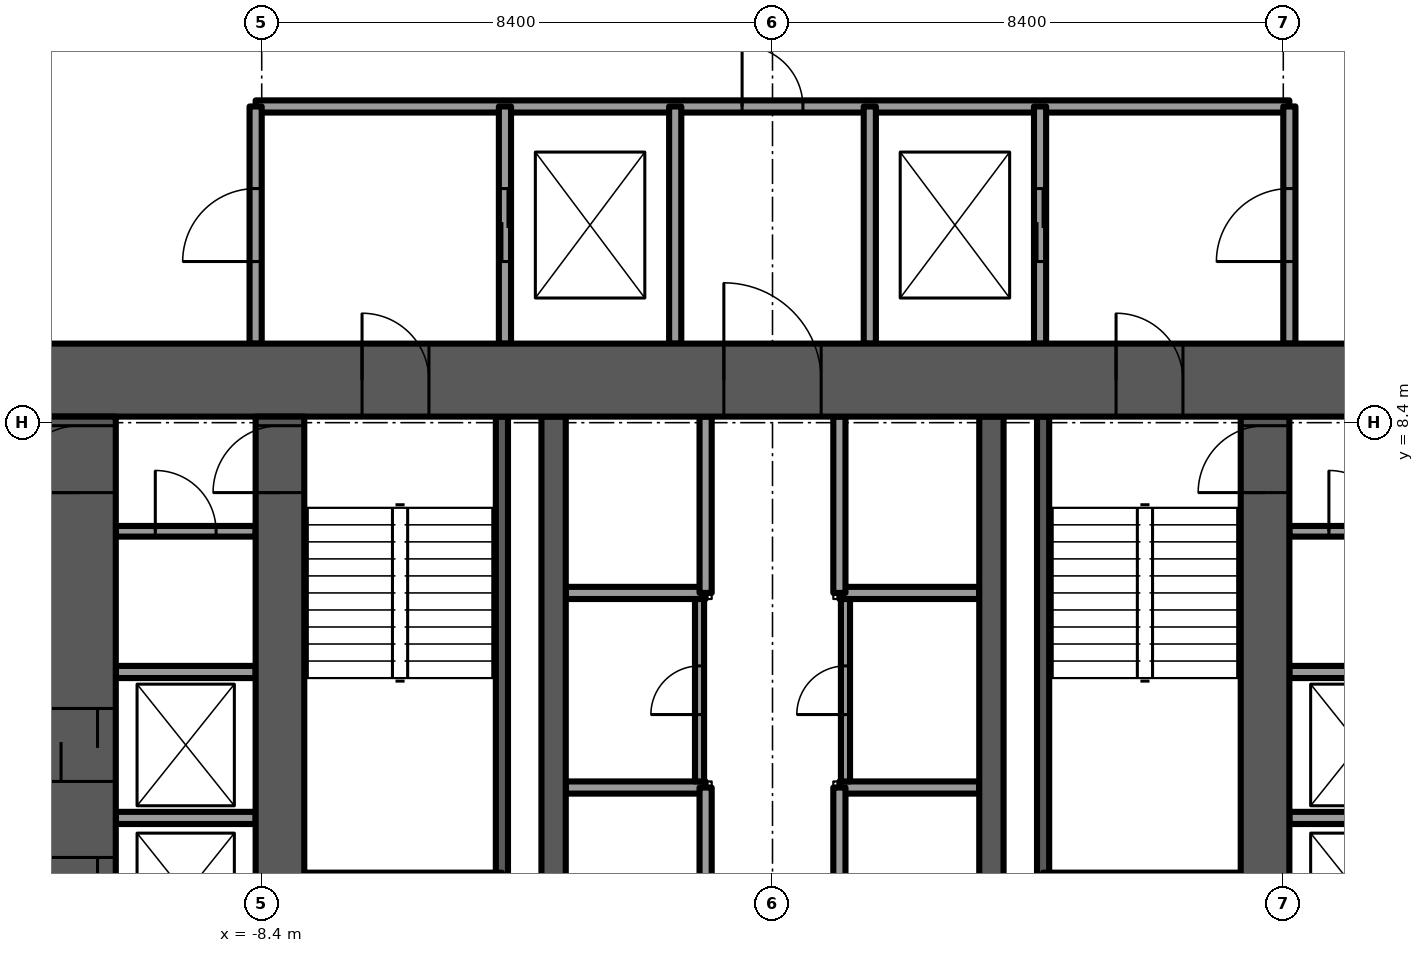
"""IFC4 building model, lengths in metres.
Left out: names, types, materials, properties, quantities, classifications, styles, units other than length and angle.
Written with IfcOpenShell. Run it as: python <this file> out.ifc"""

import sys

from ifc_helpers import new_model, si_unit, direction, frame, frame_2d, origin, place, context, subcontext, project, spatial, rectangle, extrude, element, fill, save


model = new_model("IFC4")
c1 = context("Model", 3, precision=1e-05, world=origin(), true_north=direction((0.0, 1.0)))
c2 = subcontext(c1, "Body", "Model", "MODEL_VIEW")
j1 = project(units=[si_unit("LENGTHUNIT", "METRE"), si_unit("PLANEANGLEUNIT", "RADIAN")], contexts=[c1])
p1 = place(None, origin())
s1 = spatial("IfcSite", under=j1, at=p1, CompositionType="ELEMENT")
p2 = place(p1, origin())
s2 = spatial("IfcBuilding", under=s1, at=p2, CompositionType="ELEMENT")
p3 = place(p2, frame((0.0, 0.0, 73.0)))
s3 = spatial("IfcBuildingStorey", under=s2, at=p3, CompositionType="ELEMENT", Elevation=73.0)
p4 = place(p3, frame((-12.0, 9.1, -0.3), z_axis=(0.0, 0.0, 1.0), x_axis=(1.0, 0.0, 0.0)))
e1 = element("IfcWall", 1, at=p4, inside=s3, PredefinedType="SHEAR", context=c2, shape_type="SweptSolid", body=[
    extrude(rectangle(XDim=24.0, YDim=1.2, at=frame_2d((12.0, 0.0))), origin(), (0.0, 0.0, 1.0), 3.75),
])
p5 = place(p4, frame((11.2, 0.0, 0.0)))
e2 = element("IfcOpeningElement", 2, at=p5, cuts=e1, PredefinedType="OPENING", context=c2, shape_type="SweptSolid", body=[
    extrude(rectangle(XDim=1.6, YDim=2.1, at=frame_2d((0.8, 1.05))), frame((0.0, 0.6, 0.0), z_axis=(0.0, -1.0, 0.0), x_axis=(1.0, 0.0, 0.0)), (0.0, 0.0, 1.0), 1.2),
])
p6 = place(p4, frame((5.25, 0.0, 0.0)))
e3 = element("IfcOpeningElement", 3, at=p6, cuts=e1, PredefinedType="OPENING", context=c2, shape_type="SweptSolid", body=[
    extrude(rectangle(XDim=1.1, YDim=2.1, at=frame_2d((0.55, 1.05))), frame((0.0, 0.6, 0.0), z_axis=(0.0, -1.0, 0.0), x_axis=(1.0, 0.0, 0.0)), (0.0, 0.0, 1.0), 1.2),
])
p7 = place(p4, frame((17.65, 0.0, 0.0)))
e4 = element("IfcOpeningElement", 4, at=p7, cuts=e1, PredefinedType="OPENING", context=c2, shape_type="SweptSolid", body=[
    extrude(rectangle(XDim=1.1, YDim=2.1, at=frame_2d((0.55, 1.05))), frame((0.0, 0.6, 0.0), z_axis=(0.0, -1.0, 0.0), x_axis=(1.0, 0.0, 0.0)), (0.0, 0.0, 1.0), 1.2),
])
p8 = place(p3, frame((-8.1, -0.5, -0.3), z_axis=(0.0, 0.0, 1.0), x_axis=(0.0, 1.0, 0.0)))
e5 = element("IfcWall", 5, at=p8, inside=s3, PredefinedType="SHEAR", context=c2, shape_type="SweptSolid", body=[
    extrude(rectangle(XDim=9.0, YDim=0.8, at=frame_2d((4.5, 0.0))), origin(), (0.0, 0.0, 1.0), 3.75),
])
p9 = place(p8, frame((7.75, 0.0, 0.0)))
e6 = element("IfcOpeningElement", 6, at=p9, cuts=e5, PredefinedType="OPENING", context=c2, shape_type="SweptSolid", body=[
    extrude(rectangle(XDim=1.1, YDim=2.1, at=frame_2d((0.55, 1.05))), frame((0.0, 0.4, 0.0), z_axis=(0.0, -1.0, 0.0), x_axis=(1.0, 0.0, 0.0)), (0.0, 0.0, 1.0), 0.8),
])
p10 = place(p3, frame((8.1, -0.5, -0.3), z_axis=(0.0, 0.0, 1.0), x_axis=(0.0, 1.0, 0.0)))
e7 = element("IfcWall", 7, at=p10, inside=s3, PredefinedType="SHEAR", context=c2, shape_type="SweptSolid", body=[
    extrude(rectangle(XDim=9.0, YDim=0.8, at=frame_2d((4.5, 0.0))), origin(), (0.0, 0.0, 1.0), 3.75),
])
p11 = place(p10, frame((7.75, 0.0, 0.0)))
e8 = element("IfcOpeningElement", 8, at=p11, cuts=e7, PredefinedType="OPENING", context=c2, shape_type="SweptSolid", body=[
    extrude(rectangle(XDim=1.1, YDim=2.1, at=frame_2d((0.55, 1.05))), frame((0.0, 0.4, 0.0), z_axis=(0.0, -1.0, 0.0), x_axis=(1.0, 0.0, 0.0)), (0.0, 0.0, 1.0), 0.8),
])
for number, where, z_axis, x_axis in (
    (9, (-3.6, -0.5, -0.3), (0.0, 0.0, 1.0), (0.0, 1.0, 0.0)),
    (10, (3.6, -0.5, -0.3), (0.0, 0.0, 1.0), (0.0, 1.0, 0.0)),
):
    element("IfcWall", number, at=place(p3, frame(where, z_axis=z_axis, x_axis=x_axis)), inside=s3, PredefinedType="SHEAR", context=c2, shape_type="SweptSolid", body=[
        extrude(rectangle(XDim=9.0, YDim=0.4, at=frame_2d((4.5, 0.0))), origin(), (0.0, 0.0, 1.0), 3.75),
    ])
p12 = place(p3, frame((-11.4, -0.5, -0.3), z_axis=(0.0, 0.0, 1.0), x_axis=(0.0, 1.0, 0.0)))
e11 = element("IfcWall", 11, at=p12, inside=s3, PredefinedType="SHEAR", context=c2, shape_type="SweptSolid", body=[
    extrude(rectangle(XDim=9.0, YDim=1.2, at=frame_2d((4.5, 0.0))), origin(), (0.0, 0.0, 1.0), 3.75),
])
p13 = place(p12, frame((7.75, 0.0, 0.0)))
e12 = element("IfcOpeningElement", 12, at=p13, cuts=e11, PredefinedType="OPENING", context=c2, shape_type="SweptSolid", body=[
    extrude(rectangle(XDim=1.1, YDim=2.1, at=frame_2d((0.55, 1.05))), frame((0.0, 0.6, 0.0), z_axis=(0.0, -1.0, 0.0), x_axis=(1.0, 0.0, 0.0)), (0.0, 0.0, 1.0), 1.2),
])
p14 = place(p12, frame((0.55, 0.0, 0.0)))
e13 = element("IfcOpeningElement", 13, at=p14, cuts=e11, PredefinedType="OPENING", context=c2, shape_type="SweptSolid", body=[
    extrude(rectangle(XDim=1.2, YDim=2.1, at=frame_2d((0.6, 1.05))), frame((0.0, 0.6, 0.0), z_axis=(0.0, -1.0, 0.0), x_axis=(1.0, 0.0, 0.0)), (0.0, 0.0, 1.0), 1.2),
])
p15 = place(p12, frame((3.0, 0.0, 0.0)))
e14 = element("IfcOpeningElement", 14, at=p15, cuts=e11, PredefinedType="OPENING", context=c2, shape_type="SweptSolid", body=[
    extrude(rectangle(XDim=1.2, YDim=2.1, at=frame_2d((0.6, 1.05))), frame((0.0, 0.6, 0.0), z_axis=(0.0, -1.0, 0.0), x_axis=(1.0, 0.0, 0.0)), (0.0, 0.0, 1.0), 1.2),
])
p16 = place(p3, frame((-11.571, 20.694, 0.0), z_axis=(0.0, 0.0, 1.0), x_axis=(-0.50000343918, -0.866023418164, 0.0)))
e15 = element("IfcWall", 15, at=p16, inside=s3, PredefinedType="PARAPET", context=c2, shape_type="SweptSolid", body=[
    extrude(rectangle(XDim=7.271, YDim=0.9, at=frame_2d((3.635, 0.0))), origin(), (0.0, 0.0, 1.0), 1.1),
])
for number, where, z_axis, x_axis in (
    (16, (-3.4, 2.4, 0.0), (0.0, 0.0, 1.0), (1.0, 0.0, 0.0)),
    (17, (-3.4, 5.6, 0.0), (0.0, 0.0, 1.0), (1.0, 0.0, 0.0)),
    (18, (1.1, 2.4, 0.0), (0.0, 0.0, 1.0), (1.0, 0.0, 0.0)),
    (19, (1.1, 5.6, 0.0), (0.0, 0.0, 1.0), (1.0, 0.0, 0.0)),
):
    element("IfcWall", number, at=place(p3, frame(where, z_axis=z_axis, x_axis=x_axis)), inside=s3, PredefinedType="PARTITIONING", context=c2, shape_type="SweptSolid", body=[
        extrude(rectangle(XDim=2.3, YDim=0.2, at=frame_2d((1.15, 0.0))), origin(), (0.0, 0.0, 1.0), 3.45),
    ])
for number, where, z_axis, x_axis in (
    (20, (-1.1, -0.5, 0.0), (0.0, 0.0, 1.0), (0.0, 1.0, 0.0)),
    (21, (1.1, -0.5, 0.0), (0.0, 0.0, 1.0), (0.0, 1.0, 0.0)),
    (22, (-1.1, 5.6, 0.0), (0.0, 0.0, 1.0), (0.0, 1.0, 0.0)),
    (23, (1.1, 5.6, 0.0), (0.0, 0.0, 1.0), (0.0, 1.0, 0.0)),
):
    element("IfcWall", number, at=place(p3, frame(where, z_axis=z_axis, x_axis=x_axis)), inside=s3, PredefinedType="PARTITIONING", context=c2, shape_type="SweptSolid", body=[
        extrude(rectangle(XDim=2.9, YDim=0.2, at=frame_2d((1.45, 0.0))), origin(), (0.0, 0.0, 1.0), 3.45),
    ])
for number, where, z_axis, x_axis in (
    (24, (-4.45, 0.9, -0.3), (0.0, 0.0, 1.0), (0.0, 1.0, 0.0)),
    (25, (4.45, 0.9, -0.3), (0.0, 0.0, 1.0), (0.0, 1.0, 0.0)),
):
    element("IfcWall", number, at=place(p3, frame(where, z_axis=z_axis, x_axis=x_axis)), inside=s3, PredefinedType="SOLIDWALL", context=c2, shape_type="SweptSolid", body=[
        extrude(rectangle(XDim=7.6, YDim=0.2, at=frame_2d((3.8, 0.0))), origin(), (0.0, 0.0, 1.0), 3.75),
    ])
p17 = place(p3, frame((-8.5, 13.6, 0.0), z_axis=(0.0, 0.0, 1.0), x_axis=(1.0, 0.0, 0.0)))
e26 = element("IfcWall", 26, at=p17, inside=s3, PredefinedType="PARTITIONING", context=c2, shape_type="SweptSolid", body=[
    extrude(rectangle(XDim=17.0, YDim=0.2, at=frame_2d((8.5, 0.0))), origin(), (0.0, 0.0, 1.0), 3.45),
])
p18 = place(p17, frame((8.0, 0.0, 0.0)))
e27 = element("IfcOpeningElement", 27, at=p18, cuts=e26, PredefinedType="OPENING", context=c2, shape_type="SweptSolid", body=[
    extrude(rectangle(XDim=1.0, YDim=2.1, at=frame_2d((0.5, 1.05))), frame((0.0, 0.1, 0.0), z_axis=(0.0, -1.0, 0.0), x_axis=(1.0, 0.0, 0.0)), (0.0, 0.0, 1.0), 0.2),
])
p19 = place(p3, frame((-8.5, 9.7, 0.0), z_axis=(0.0, 0.0, 1.0), x_axis=(0.0, 1.0, 0.0)))
e28 = element("IfcWall", 28, at=p19, inside=s3, PredefinedType="PARTITIONING", context=c2, shape_type="SweptSolid", body=[
    extrude(rectangle(XDim=3.9, YDim=0.2, at=frame_2d((1.95, 0.0))), origin(), (0.0, 0.0, 1.0), 3.45),
])
p20 = place(p19, frame((1.35, 0.0, 0.0)))
e29 = element("IfcOpeningElement", 29, at=p20, cuts=e28, PredefinedType="OPENING", context=c2, shape_type="SweptSolid", body=[
    extrude(rectangle(XDim=1.2, YDim=2.1, at=frame_2d((0.6, 1.05))), frame((0.0, 0.1, 0.0), z_axis=(0.0, -1.0, 0.0), x_axis=(1.0, 0.0, 0.0)), (0.0, 0.0, 1.0), 0.2),
])
p21 = place(p3, frame((8.5, 9.7, 0.0), z_axis=(0.0, 0.0, 1.0), x_axis=(0.0, 1.0, 0.0)))
e30 = element("IfcWall", 30, at=p21, inside=s3, PredefinedType="PARTITIONING", context=c2, shape_type="SweptSolid", body=[
    extrude(rectangle(XDim=3.9, YDim=0.2, at=frame_2d((1.95, 0.0))), origin(), (0.0, 0.0, 1.0), 3.45),
])
p22 = place(p21, frame((1.35, 0.0, 0.0)))
e31 = element("IfcOpeningElement", 31, at=p22, cuts=e30, PredefinedType="OPENING", context=c2, shape_type="SweptSolid", body=[
    extrude(rectangle(XDim=1.2, YDim=2.1, at=frame_2d((0.6, 1.05))), frame((0.0, 0.1, 0.0), z_axis=(0.0, -1.0, 0.0), x_axis=(1.0, 0.0, 0.0)), (0.0, 0.0, 1.0), 0.2),
])
p23 = place(p3, frame((-4.4, 9.7, 0.0), z_axis=(0.0, 0.0, 1.0), x_axis=(0.0, 1.0, 0.0)))
e32 = element("IfcWall", 32, at=p23, inside=s3, PredefinedType="PARTITIONING", context=c2, shape_type="SweptSolid", body=[
    extrude(rectangle(XDim=3.9, YDim=0.2, at=frame_2d((1.95, 0.0))), origin(), (0.0, 0.0, 1.0), 3.45),
])
p24 = place(p23, frame((1.35, 0.0, 0.0)))
e33 = element("IfcOpeningElement", 33, at=p24, cuts=e32, PredefinedType="OPENING", context=c2, shape_type="SweptSolid", body=[
    extrude(rectangle(XDim=1.2, YDim=2.1, at=frame_2d((0.6, 1.05))), frame((0.0, 0.1, 0.0), z_axis=(0.0, -1.0, 0.0), x_axis=(1.0, 0.0, 0.0)), (0.0, 0.0, 1.0), 0.2),
])
p25 = place(p3, frame((4.4, 9.7, 0.0), z_axis=(0.0, 0.0, 1.0), x_axis=(0.0, 1.0, 0.0)))
e34 = element("IfcWall", 34, at=p25, inside=s3, PredefinedType="PARTITIONING", context=c2, shape_type="SweptSolid", body=[
    extrude(rectangle(XDim=3.9, YDim=0.2, at=frame_2d((1.95, 0.0))), origin(), (0.0, 0.0, 1.0), 3.45),
])
p26 = place(p25, frame((1.35, 0.0, 0.0)))
e35 = element("IfcOpeningElement", 35, at=p26, cuts=e34, PredefinedType="OPENING", context=c2, shape_type="SweptSolid", body=[
    extrude(rectangle(XDim=1.2, YDim=2.1, at=frame_2d((0.6, 1.05))), frame((0.0, 0.1, 0.0), z_axis=(0.0, -1.0, 0.0), x_axis=(1.0, 0.0, 0.0)), (0.0, 0.0, 1.0), 0.2),
])
for number, where, z_axis, x_axis in (
    (36, (-1.6, 9.7, 0.0), (0.0, 0.0, 1.0), (0.0, 1.0, 0.0)),
    (37, (1.6, 9.7, 0.0), (0.0, 0.0, 1.0), (0.0, 1.0, 0.0)),
):
    element("IfcWall", number, at=place(p3, frame(where, z_axis=z_axis, x_axis=x_axis)), inside=s3, PredefinedType="PARTITIONING", context=c2, shape_type="SweptSolid", body=[
        extrude(rectangle(XDim=3.9, YDim=0.2, at=frame_2d((1.95, 0.0))), origin(), (0.0, 0.0, 1.0), 3.45),
    ])
p27 = place(p3, frame((-1.2, 2.5, 0.0), z_axis=(0.0, 0.0, 1.0), x_axis=(0.0, 1.0, 0.0)))
e38 = element("IfcWall", 38, at=p27, inside=s3, PredefinedType="PARTITIONING", context=c2, shape_type="SweptSolid", body=[
    extrude(rectangle(XDim=3.0, YDim=0.15, at=frame_2d((1.5, 0.0))), origin(), (0.0, 0.0, 1.0), 3.45),
])
p28 = place(p27, frame((1.1, 0.0, 0.0)))
e39 = element("IfcOpeningElement", 39, at=p28, cuts=e38, PredefinedType="OPENING", context=c2, shape_type="SweptSolid", body=[
    extrude(rectangle(XDim=0.8, YDim=2.1, at=frame_2d((0.4, 1.05))), frame((0.0, 0.075, 0.0), z_axis=(0.0, -1.0, 0.0), x_axis=(1.0, 0.0, 0.0)), (0.0, 0.0, 1.0), 0.15),
])
p29 = place(p3, frame((1.2, 2.5, 0.0), z_axis=(0.0, 0.0, 1.0), x_axis=(0.0, 1.0, 0.0)))
e40 = element("IfcWall", 40, at=p29, inside=s3, PredefinedType="PARTITIONING", context=c2, shape_type="SweptSolid", body=[
    extrude(rectangle(XDim=3.0, YDim=0.15, at=frame_2d((1.5, 0.0))), origin(), (0.0, 0.0, 1.0), 3.45),
])
p30 = place(p29, frame((1.1, 0.0, 0.0)))
e41 = element("IfcOpeningElement", 41, at=p30, cuts=e40, PredefinedType="OPENING", context=c2, shape_type="SweptSolid", body=[
    extrude(rectangle(XDim=0.8, YDim=2.1, at=frame_2d((0.4, 1.05))), frame((0.0, 0.075, 0.0), z_axis=(0.0, -1.0, 0.0), x_axis=(1.0, 0.0, 0.0)), (0.0, 0.0, 1.0), 0.15),
])
for number, where, z_axis, x_axis in (
    (42, (-10.8, 1.9, 0.0), (0.0, 0.0, 1.0), (1.0, 0.0, 0.0)),
    (43, (-10.8, 4.3, 0.0), (0.0, 0.0, 1.0), (1.0, 0.0, 0.0)),
):
    element("IfcWall", number, at=place(p3, frame(where, z_axis=z_axis, x_axis=x_axis)), inside=s3, PredefinedType="PARTITIONING", context=c2, shape_type="SweptSolid", body=[
        extrude(rectangle(XDim=2.3, YDim=0.2, at=frame_2d((1.15, 0.0))), origin(), (0.0, 0.0, 1.0), 3.45),
    ])
p31 = place(p3, frame((-10.8, 6.614, 0.0), z_axis=(0.0, 0.0, 1.0), x_axis=(1.0, 0.0, 0.0)))
e44 = element("IfcWall", 44, at=p31, inside=s3, PredefinedType="PARTITIONING", context=c2, shape_type="SweptSolid", body=[
    extrude(rectangle(XDim=2.3, YDim=0.175, at=frame_2d((1.15, 0.0))), origin(), (0.0, 0.0, 1.0), 3.45),
])
p32 = place(p31, frame((0.65, 0.0, 0.0)))
e45 = element("IfcOpeningElement", 45, at=p32, cuts=e44, PredefinedType="OPENING", context=c2, shape_type="SweptSolid", body=[
    extrude(rectangle(XDim=1.0, YDim=2.1, at=frame_2d((0.5, 1.05))), frame((0.0, 0.087, 0.0), z_axis=(0.0, -1.0, 0.0), x_axis=(1.0, 0.0, 0.0)), (0.0, 0.0, 1.0), 0.175),
])
for number, where, z_axis, x_axis in (
    (46, (8.5, 1.9, 0.0), (0.0, 0.0, 1.0), (1.0, 0.0, 0.0)),
    (47, (8.5, 4.3, 0.0), (0.0, 0.0, 1.0), (1.0, 0.0, 0.0)),
):
    element("IfcWall", number, at=place(p3, frame(where, z_axis=z_axis, x_axis=x_axis)), inside=s3, PredefinedType="PARTITIONING", context=c2, shape_type="SweptSolid", body=[
        extrude(rectangle(XDim=2.3, YDim=0.2, at=frame_2d((1.15, 0.0))), origin(), (0.0, 0.0, 1.0), 3.45),
    ])
p33 = place(p3, frame((8.5, 6.614, 0.0), z_axis=(0.0, 0.0, 1.0), x_axis=(1.0, 0.0, 0.0)))
e48 = element("IfcWall", 48, at=p33, inside=s3, PredefinedType="PARTITIONING", context=c2, shape_type="SweptSolid", body=[
    extrude(rectangle(XDim=2.3, YDim=0.175, at=frame_2d((1.15, 0.0))), origin(), (0.0, 0.0, 1.0), 3.45),
])
p34 = place(p33, frame((0.65, 0.0, 0.0)))
e49 = element("IfcOpeningElement", 49, at=p34, cuts=e48, PredefinedType="OPENING", context=c2, shape_type="SweptSolid", body=[
    extrude(rectangle(XDim=1.0, YDim=2.1, at=frame_2d((0.5, 1.05))), frame((0.0, 0.087, 0.0), z_axis=(0.0, -1.0, 0.0), x_axis=(1.0, 0.0, 0.0)), (0.0, 0.0, 1.0), 0.175),
])
p35 = place(p5, origin())
e50 = element("IfcDoor", 50, at=p35, inside=s3, OperationType="DOUBLE_DOOR_SINGLE_SWING", PredefinedType="DOOR", context=c2, shape_type="SweptSolid", body=[
    extrude(rectangle(XDim=1.6, YDim=2.1, at=frame_2d((0.8, 1.05))), frame((0.0, 0.025, 0.0), z_axis=(0.0, -1.0, 0.0), x_axis=(1.0, 0.0, 0.0)), (0.0, 0.0, 1.0), 0.05),
])
fill(e2, e50)
p36 = place(p6, origin())
e51 = element("IfcDoor", 51, at=p36, inside=s3, OperationType="SINGLE_SWING_LEFT", PredefinedType="DOOR", context=c2, shape_type="SweptSolid", body=[
    extrude(rectangle(XDim=1.1, YDim=2.1, at=frame_2d((0.55, 1.05))), frame((0.0, 0.025, 0.0), z_axis=(0.0, -1.0, 0.0), x_axis=(1.0, 0.0, 0.0)), (0.0, 0.0, 1.0), 0.05),
])
fill(e3, e51)
p37 = place(p9, origin())
e52 = element("IfcDoor", 52, at=p37, inside=s3, OperationType="SINGLE_SWING_RIGHT", PredefinedType="DOOR", context=c2, shape_type="SweptSolid", body=[
    extrude(rectangle(XDim=1.1, YDim=2.1, at=frame_2d((0.55, 1.05))), frame((0.0, 0.025, 0.0), z_axis=(0.0, -1.0, 0.0), x_axis=(1.0, 0.0, 0.0)), (0.0, 0.0, 1.0), 0.05),
])
fill(e6, e52)
p38 = place(p7, origin())
e53 = element("IfcDoor", 53, at=p38, inside=s3, OperationType="SINGLE_SWING_RIGHT", PredefinedType="DOOR", context=c2, shape_type="SweptSolid", body=[
    extrude(rectangle(XDim=1.1, YDim=2.1, at=frame_2d((0.55, 1.05))), frame((0.0, 0.025, 0.0), z_axis=(0.0, -1.0, 0.0), x_axis=(1.0, 0.0, 0.0)), (0.0, 0.0, 1.0), 0.05),
])
fill(e4, e53)
p39 = place(p11, origin())
e54 = element("IfcDoor", 54, at=p39, inside=s3, OperationType="SINGLE_SWING_LEFT", PredefinedType="DOOR", context=c2, shape_type="SweptSolid", body=[
    extrude(rectangle(XDim=1.1, YDim=2.1, at=frame_2d((0.55, 1.05))), frame((0.0, 0.025, 0.0), z_axis=(0.0, -1.0, 0.0), x_axis=(1.0, 0.0, 0.0)), (0.0, 0.0, 1.0), 0.05),
])
fill(e8, e54)
p40 = place(p24, origin())
e55 = element("IfcDoor", 55, at=p40, inside=s3, OperationType="SLIDING_TO_LEFT", PredefinedType="DOOR", context=c2, shape_type="SweptSolid", body=[
    extrude(rectangle(XDim=1.2, YDim=2.1, at=frame_2d((0.6, 1.05))), frame((0.0, 0.025, 0.0), z_axis=(0.0, -1.0, 0.0), x_axis=(1.0, 0.0, 0.0)), (0.0, 0.0, 1.0), 0.05),
])
fill(e33, e55)
p41 = place(p20, origin())
e56 = element("IfcDoor", 56, at=p41, inside=s3, OperationType="SINGLE_SWING_LEFT", PredefinedType="DOOR", context=c2, shape_type="SweptSolid", body=[
    extrude(rectangle(XDim=1.2, YDim=2.1, at=frame_2d((0.6, 1.05))), frame((0.0, 0.025, 0.0), z_axis=(0.0, -1.0, 0.0), x_axis=(1.0, 0.0, 0.0)), (0.0, 0.0, 1.0), 0.05),
])
fill(e29, e56)
p42 = place(p26, origin())
e57 = element("IfcDoor", 57, at=p42, inside=s3, OperationType="SLIDING_TO_LEFT", PredefinedType="DOOR", context=c2, shape_type="SweptSolid", body=[
    extrude(rectangle(XDim=1.2, YDim=2.1, at=frame_2d((0.6, 1.05))), frame((0.0, 0.025, 0.0), z_axis=(0.0, -1.0, 0.0), x_axis=(1.0, 0.0, 0.0)), (0.0, 0.0, 1.0), 0.05),
])
fill(e35, e57)
p43 = place(p22, origin())
e58 = element("IfcDoor", 58, at=p43, inside=s3, OperationType="SINGLE_SWING_LEFT", PredefinedType="DOOR", context=c2, shape_type="SweptSolid", body=[
    extrude(rectangle(XDim=1.2, YDim=2.1, at=frame_2d((0.6, 1.05))), frame((0.0, 0.025, 0.0), z_axis=(0.0, -1.0, 0.0), x_axis=(1.0, 0.0, 0.0)), (0.0, 0.0, 1.0), 0.05),
])
fill(e31, e58)
p44 = place(p18, origin())
e59 = element("IfcDoor", 59, at=p44, inside=s3, OperationType="SINGLE_SWING_LEFT", PredefinedType="DOOR", context=c2, shape_type="SweptSolid", body=[
    extrude(rectangle(XDim=1.0, YDim=2.1, at=frame_2d((0.5, 1.05))), frame((0.0, 0.025, 0.0), z_axis=(0.0, -1.0, 0.0), x_axis=(1.0, 0.0, 0.0)), (0.0, 0.0, 1.0), 0.05),
])
fill(e27, e59)
p45 = place(p28, origin())
e60 = element("IfcDoor", 60, at=p45, inside=s3, OperationType="SINGLE_SWING_LEFT", PredefinedType="DOOR", context=c2, shape_type="SweptSolid", body=[
    extrude(rectangle(XDim=0.8, YDim=2.1, at=frame_2d((0.4, 1.05))), frame((0.0, 0.025, 0.0), z_axis=(0.0, -1.0, 0.0), x_axis=(1.0, 0.0, 0.0)), (0.0, 0.0, 1.0), 0.05),
])
fill(e39, e60)
p46 = place(p30, origin())
e61 = element("IfcDoor", 61, at=p46, inside=s3, OperationType="SINGLE_SWING_RIGHT", PredefinedType="DOOR", context=c2, shape_type="SweptSolid", body=[
    extrude(rectangle(XDim=0.8, YDim=2.1, at=frame_2d((0.4, 1.05))), frame((0.0, 0.025, 0.0), z_axis=(0.0, -1.0, 0.0), x_axis=(1.0, 0.0, 0.0)), (0.0, 0.0, 1.0), 0.05),
])
fill(e41, e61)
p47 = place(p32, origin())
e62 = element("IfcDoor", 62, at=p47, inside=s3, OperationType="SINGLE_SWING_LEFT", PredefinedType="DOOR", context=c2, shape_type="SweptSolid", body=[
    extrude(rectangle(XDim=1.0, YDim=2.1, at=frame_2d((0.5, 1.05))), frame((0.0, 0.025, 0.0), z_axis=(0.0, -1.0, 0.0), x_axis=(1.0, 0.0, 0.0)), (0.0, 0.0, 1.0), 0.05),
])
fill(e45, e62)
p48 = place(p13, origin())
e63 = element("IfcDoor", 63, at=p48, inside=s3, OperationType="SINGLE_SWING_LEFT", PredefinedType="DOOR", context=c2, shape_type="SweptSolid", body=[
    extrude(rectangle(XDim=1.1, YDim=2.1, at=frame_2d((0.55, 1.05))), frame((0.0, 0.025, 0.0), z_axis=(0.0, -1.0, 0.0), x_axis=(1.0, 0.0, 0.0)), (0.0, 0.0, 1.0), 0.05),
])
fill(e12, e63)
p49 = place(p14, origin())
e64 = element("IfcDoor", 64, at=p49, inside=s3, OperationType="SLIDING_TO_LEFT", PredefinedType="DOOR", context=c2, shape_type="SweptSolid", body=[
    extrude(rectangle(XDim=1.2, YDim=2.1, at=frame_2d((0.6, 1.05))), frame((0.0, 0.025, 0.0), z_axis=(0.0, -1.0, 0.0), x_axis=(1.0, 0.0, 0.0)), (0.0, 0.0, 1.0), 0.05),
])
fill(e13, e64)
p50 = place(p15, origin())
e65 = element("IfcDoor", 65, at=p50, inside=s3, OperationType="SLIDING_TO_LEFT", PredefinedType="DOOR", context=c2, shape_type="SweptSolid", body=[
    extrude(rectangle(XDim=1.2, YDim=2.1, at=frame_2d((0.6, 1.05))), frame((0.0, 0.025, 0.0), z_axis=(0.0, -1.0, 0.0), x_axis=(1.0, 0.0, 0.0)), (0.0, 0.0, 1.0), 0.05),
])
fill(e14, e65)
p51 = place(p34, origin())
e66 = element("IfcDoor", 66, at=p51, inside=s3, OperationType="SINGLE_SWING_RIGHT", PredefinedType="DOOR", context=c2, shape_type="SweptSolid", body=[
    extrude(rectangle(XDim=1.0, YDim=2.1, at=frame_2d((0.5, 1.05))), frame((0.0, 0.025, 0.0), z_axis=(0.0, -1.0, 0.0), x_axis=(1.0, 0.0, 0.0)), (0.0, 0.0, 1.0), 0.05),
])
fill(e49, e66)
save(model, sys.argv[1])
